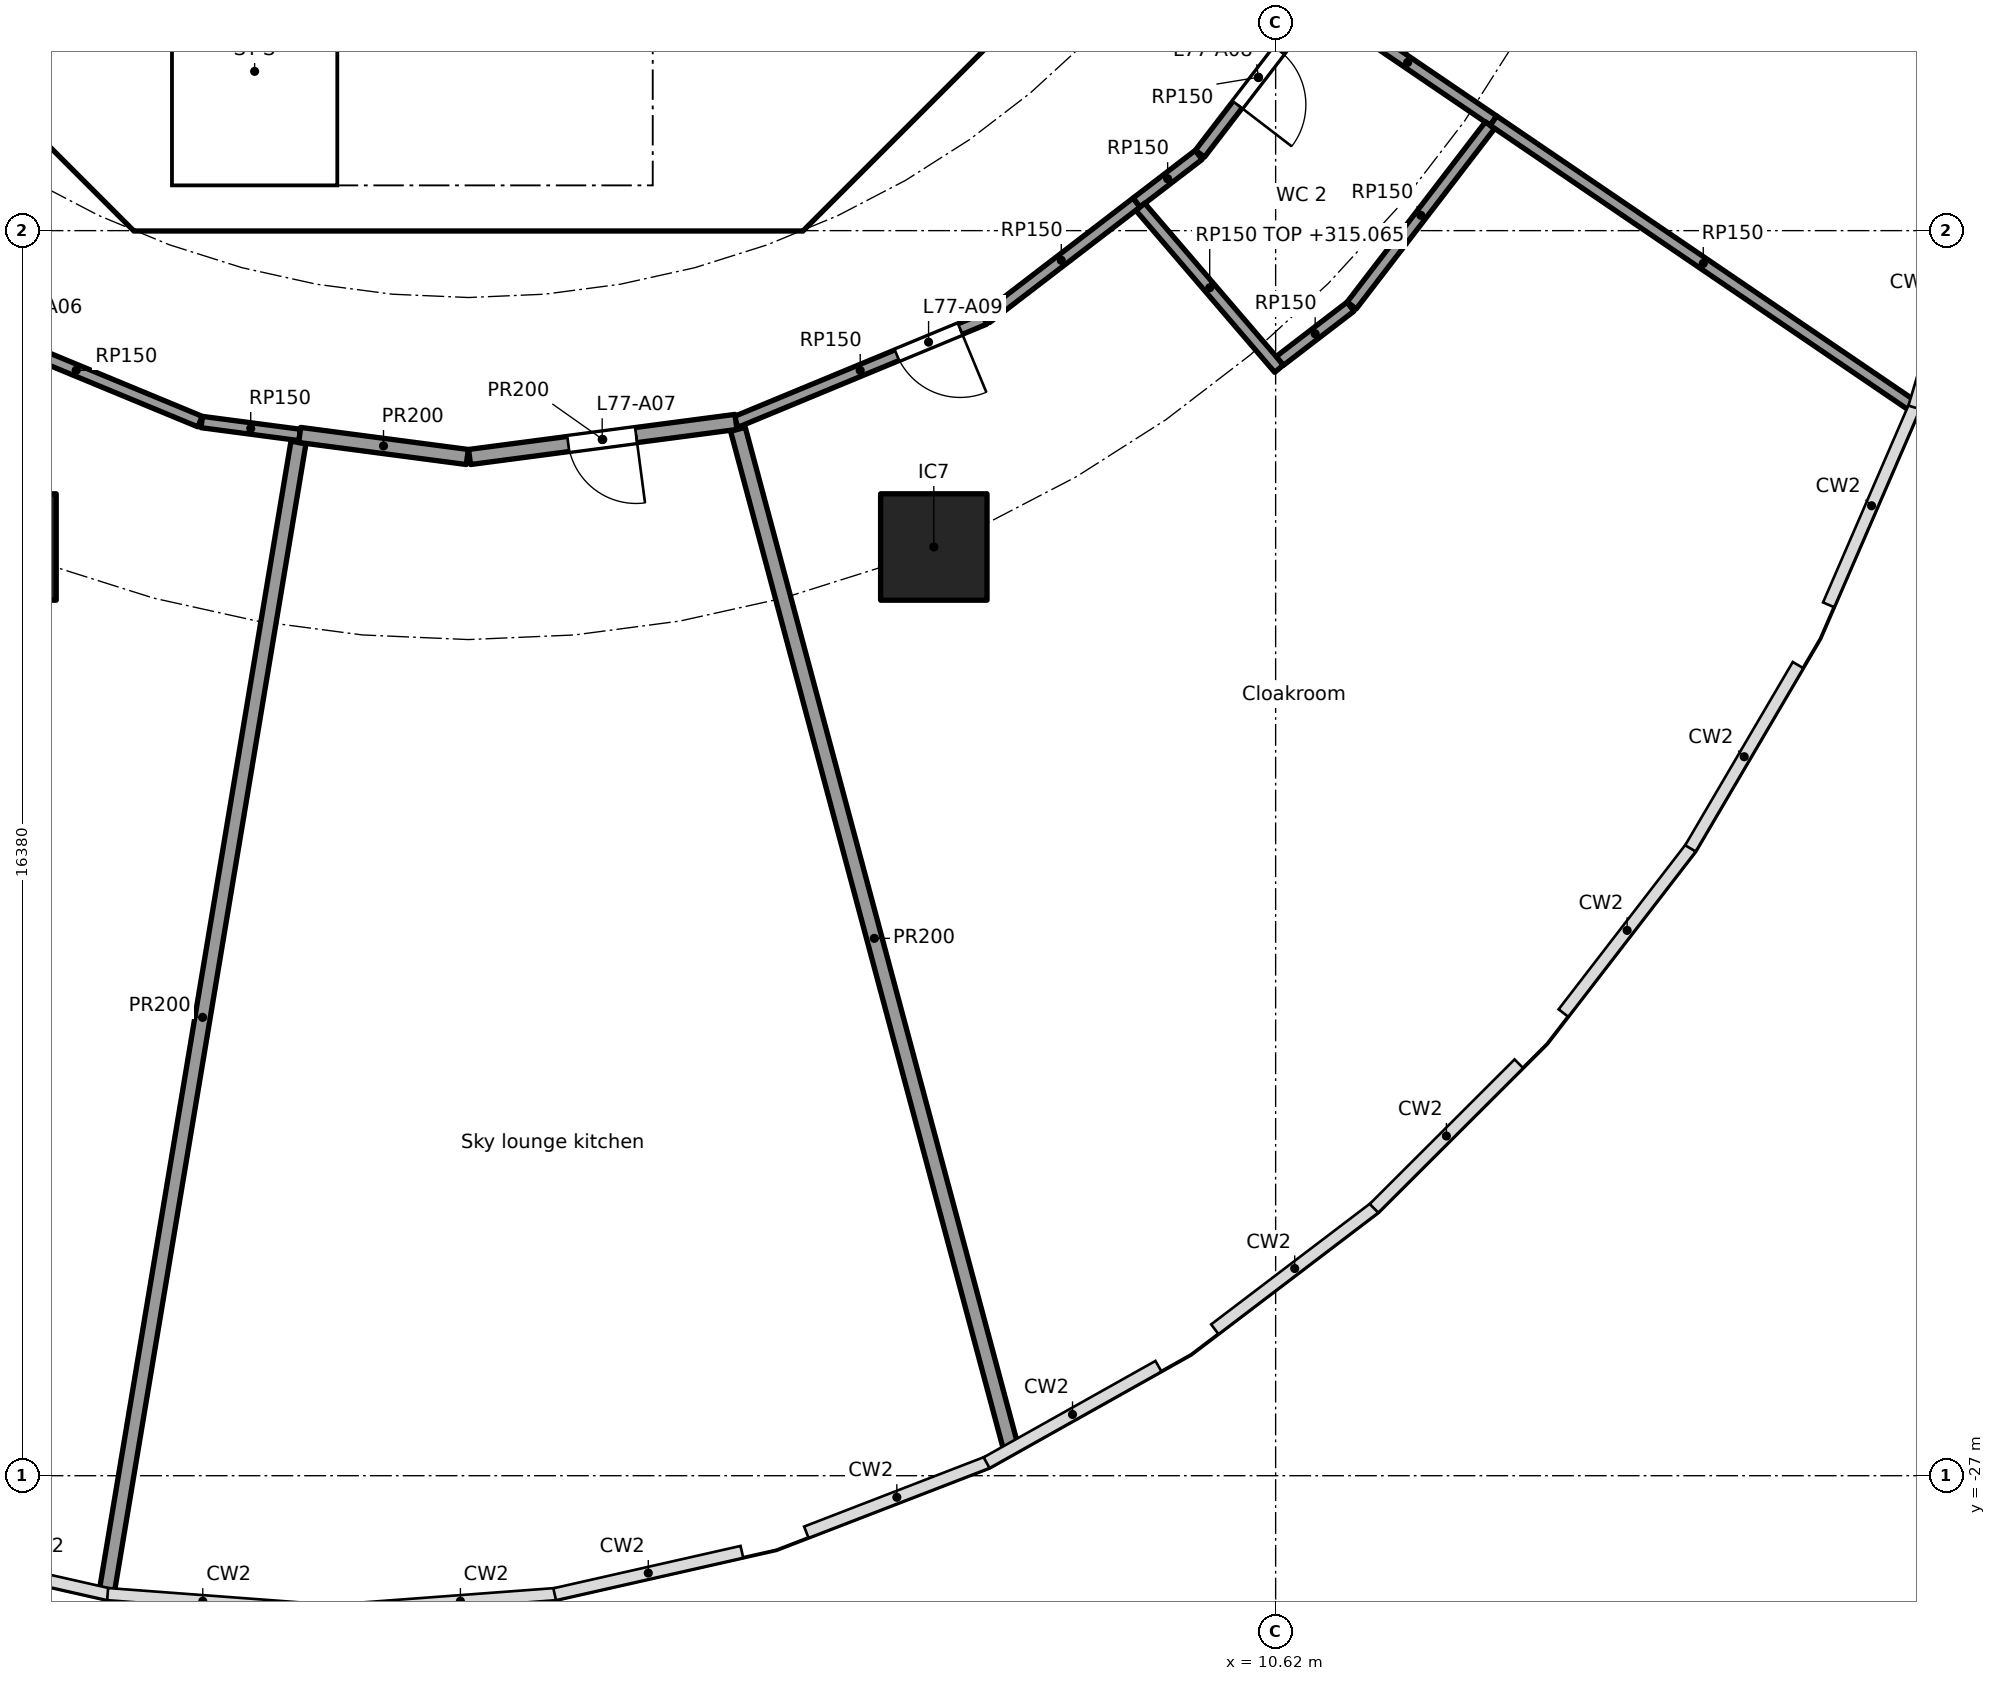
"""IFC4 building model, lengths in metres.
Left out: names, types, materials, properties, quantities, classifications, styles, units other than length and angle.
Written with IfcOpenShell. Run it as: python <this file> out.ifc"""

import sys

from ifc_helpers import new_model, si_unit, direction, frame, frame_2d, origin, origin_2d, place, context, subcontext, project, spatial, polyline, rectangle, outline, extrude, element, fill, save


model = new_model("IFC4")
c1 = context("Model", 3, precision=1e-05, world=origin(), true_north=direction((0.0, 1.0)))
c2 = subcontext(c1, "Body", "Model", "MODEL_VIEW")
j1 = project(units=[si_unit("LENGTHUNIT", "METRE"), si_unit("PLANEANGLEUNIT", "RADIAN")], contexts=[c1])
p1 = place(None, origin())
s1 = spatial("IfcSite", under=j1, at=p1, CompositionType="ELEMENT")
p2 = place(p1, origin())
s2 = spatial("IfcBuilding", under=s1, at=p2, CompositionType="ELEMENT")
p3 = place(p2, frame((0.0, 0.0, 310.3)))
s3 = spatial("IfcBuildingStorey", under=s2, at=p3, CompositionType="ELEMENT", Elevation=310.3)
for number, where, z_axis, x_axis in (
    (1, (-6.123, -14.782, 0.0), (0.0, 0.0, 1.0), (1.0, 0.0, 0.0)),
    (2, (6.123, -14.782, 0.0), (0.0, 0.0, 1.0), (1.0, 0.0, 0.0)),
):
    element("IfcColumn", number, at=place(p3, frame(where, z_axis=z_axis, x_axis=x_axis)), inside=s3, PredefinedType="COLUMN", context=c2, shape_type="SweptSolid", body=[
        extrude(rectangle(XDim=1.4, YDim=1.4, at=origin_2d()), origin(), (0.0, 0.0, 1.0), 5.6),
    ])
p4 = place(p3, frame((-9.988, -4.613, 0.0), z_axis=(0.0, 0.0, 1.0), x_axis=(0.707106781187, -0.707106781187, 0.0)))
e3 = element("IfcWall", 3, at=p4, inside=s3, PredefinedType="SHEAR", context=c2, shape_type="SweptSolid", body=[
    extrude(rectangle(XDim=7.602, YDim=0.6, at=frame_2d((3.801, 0.0))), origin(), (0.0, 0.0, 1.0), 5.3),
])
p5 = place(p4, frame((6.151, 0.0, 0.0)))
e4 = element("IfcOpeningElement", 4, at=p5, cuts=e3, PredefinedType="OPENING", context=c2, shape_type="SweptSolid", body=[
    extrude(rectangle(XDim=1.1, YDim=2.1, at=frame_2d((0.55, 1.05))), frame((0.0, 0.31, 0.0), z_axis=(0.0, -1.0, 0.0), x_axis=(1.0, 0.0, 0.0)), (0.0, 0.0, 1.0), 0.62),
])
p6 = place(p3, frame((4.613, -9.988, 0.0), z_axis=(0.0, 0.0, 1.0), x_axis=(0.707106781187, 0.707106781187, 0.0)))
e5 = element("IfcWall", 5, at=p6, inside=s3, PredefinedType="SHEAR", context=c2, shape_type="SweptSolid", body=[
    extrude(rectangle(XDim=7.602, YDim=0.6, at=frame_2d((3.801, 0.0))), origin(), (0.0, 0.0, 1.0), 5.3),
])
p7 = place(p6, frame((3.201, 0.0, 0.0)))
e6 = element("IfcOpeningElement", 6, at=p7, cuts=e5, PredefinedType="OPENING", context=c2, shape_type="SweptSolid", body=[
    extrude(rectangle(XDim=1.2, YDim=2.1, at=frame_2d((0.6, 1.05))), frame((0.0, 0.31, 0.0), z_axis=(0.0, -1.0, 0.0), x_axis=(1.0, 0.0, 0.0)), (0.0, 0.0, 1.0), 0.62),
])
p8 = place(p3, frame((4.0, -10.025, 0.0), z_axis=(0.0, 0.0, 1.0), x_axis=(0.0, 1.0, 0.0)))
e7 = element("IfcWall", 7, at=p8, inside=s3, PredefinedType="SOLIDWALL", context=c2, shape_type="SweptSolid", body=[
    extrude(rectangle(XDim=3.0, YDim=0.2, at=frame_2d((1.5, 0.0))), origin(), (0.0, 0.0, 1.0), 5.3),
])
p9 = place(p8, frame((0.975, 0.0, 0.0)))
e8 = element("IfcOpeningElement", 8, at=p9, cuts=e7, PredefinedType="OPENING", context=c2, shape_type="SweptSolid", body=[
    extrude(rectangle(XDim=1.1, YDim=2.1, at=frame_2d((0.55, 1.05))), frame((0.0, 0.11, 0.0), z_axis=(0.0, -1.0, 0.0), x_axis=(1.0, 0.0, 0.0)), (0.0, 0.0, 1.0), 0.22),
])
p10 = place(p3, origin())
e9 = element("IfcWall", 9, at=p10, inside=s3, PredefinedType="SHEAR", context=c2, shape_type="SweptSolid", body=[
    extrude(outline(polyline([(-4.152, -10.025), (4.152, -10.025), (4.401, -9.776), (4.825, -10.2), (4.401, -10.625), (-4.401, -10.625), (-4.825, -10.2), (-4.401, -9.776), (-4.152, -10.025)])), origin(), (0.0, 0.0, 1.0), 5.3),
])
p11 = place(p3, origin())
e10 = element("IfcWall", 10, at=p11, inside=s3, PredefinedType="SOLIDWALL", context=c2, shape_type="SweptSolid", body=[
    extrude(outline(polyline([(-3.9, -10.025), (-4.1, -10.025), (-4.1, -7.025), (-3.9, -7.025), (-3.9, -10.025)])), origin(), (0.0, 0.0, 1.0), 5.3),
])
p12 = place(p3, frame((-3.531, -13.132, 0.0), z_axis=(0.0, 0.0, 1.0), x_axis=(-0.923881838111, 0.382677866108, 0.0)))
e11 = element("IfcWall", 11, at=p12, inside=s3, PredefinedType="PARTITIONING", context=c2, shape_type="SweptSolid", body=[
    extrude(rectangle(XDim=3.527, YDim=0.15, at=frame_2d((1.763, 0.0))), origin(), (0.0, 0.0, 1.0), 5.3),
])
p13 = place(p12, frame((2.281, 0.0, 0.0)))
e12 = element("IfcOpeningElement", 12, at=p13, cuts=e11, PredefinedType="OPENING", context=c2, shape_type="SweptSolid", body=[
    extrude(rectangle(XDim=0.9, YDim=2.1, at=frame_2d((0.45, 1.05))), frame((0.0, 0.085, 0.0), z_axis=(0.0, -1.0, 0.0), x_axis=(1.0, 0.0, 0.0)), (0.0, 0.0, 1.0), 0.17),
])
p14 = place(p3, frame((-2.219, -13.308, 0.0), z_axis=(0.0, 0.0, 1.0), x_axis=(-0.991441503566, 0.130551694767, 0.0)))
e13 = element("IfcWall", 13, at=p14, inside=s3, PredefinedType="PARTITIONING", context=c2, shape_type="SweptSolid", body=[
    extrude(rectangle(XDim=1.3, YDim=0.15, at=frame_2d((0.65, 0.0))), origin(), (0.0, 0.0, 1.0), 5.3),
])
p15 = place(p3, frame((6.789, -11.782, 0.0), z_axis=(0.0, 0.0, 1.0), x_axis=(-0.923862934009, -0.382723502237, 0.0)))
e14 = element("IfcWall", 14, at=p15, inside=s3, PredefinedType="PARTITIONING", context=c2, shape_type="SweptSolid", body=[
    extrude(rectangle(XDim=3.538, YDim=0.15, at=frame_2d((1.769, 0.0))), origin(), (0.0, 0.0, 1.0), 5.3),
])
p16 = place(p15, frame((0.346, 0.0, 0.0)))
e15 = element("IfcOpeningElement", 15, at=p16, cuts=e14, PredefinedType="OPENING", context=c2, shape_type="SweptSolid", body=[
    extrude(rectangle(XDim=0.9, YDim=2.1, at=frame_2d((0.45, 1.05))), frame((0.0, 0.085, 0.0), z_axis=(0.0, -1.0, 0.0), x_axis=(1.0, 0.0, 0.0)), (0.0, 0.0, 1.0), 0.17),
])
p17 = place(p3, frame((8.791, -10.25, 0.0), z_axis=(0.0, 0.0, 1.0), x_axis=(-0.7933828864, -0.608722921835, 0.0)))
e16 = element("IfcWall", 16, at=p17, inside=s3, PredefinedType="PARTITIONING", context=c2, shape_type="SweptSolid", body=[
    extrude(rectangle(XDim=2.498, YDim=0.15, at=frame_2d((1.249, 0.0))), origin(), (0.0, 0.0, 1.0), 5.3),
])
p18 = place(p3, frame((9.607, -9.624, 0.0), z_axis=(0.0, 0.0, 1.0), x_axis=(-0.793346631306, -0.608770172228, 0.0)))
e17 = element("IfcWall", 17, at=p18, inside=s3, PredefinedType="PARTITIONING", context=c2, shape_type="SweptSolid", body=[
    extrude(rectangle(XDim=1.029, YDim=0.15, at=frame_2d((0.515, 0.0))), origin(), (0.0, 0.0, 1.0), 5.3),
])
p19 = place(p3, frame((10.665, -12.436, 0.0), z_axis=(0.0, 0.0, 1.0), x_axis=(-0.651063790324, 0.759023017391, 0.0)))
e18 = element("IfcWall", 18, at=p19, inside=s3, PredefinedType="PARTITIONING", context=c2, shape_type="SweptSolid", body=[
    extrude(rectangle(XDim=2.804, YDim=0.15, at=frame_2d((1.402, 0.0))), origin(), (0.0, 0.0, 1.0), 4.765),
])
p20 = place(p3, frame((11.167, -7.596, 0.0), z_axis=(0.0, 0.0, 1.0), x_axis=(-0.60871867817, -0.793386142334, 0.0)))
e19 = element("IfcWall", 19, at=p20, inside=s3, PredefinedType="PARTITIONING", context=c2, shape_type="SweptSolid", body=[
    extrude(rectangle(XDim=2.534, YDim=0.15, at=frame_2d((1.267, 0.0))), origin(), (0.0, 0.0, 1.0), 5.3),
])
p21 = place(p20, frame((0.823, 0.0, 0.0)))
e20 = element("IfcOpeningElement", 20, at=p21, cuts=e19, PredefinedType="OPENING", context=c2, shape_type="SweptSolid", body=[
    extrude(rectangle(XDim=0.9, YDim=2.1, at=frame_2d((0.45, 1.05))), frame((0.0, 0.085, 0.0), z_axis=(0.0, -1.0, 0.0), x_axis=(1.0, 0.0, 0.0)), (0.0, 0.0, 1.0), 0.17),
])
p22 = place(p3, frame((11.229, -7.639, 0.0), z_axis=(0.0, 0.0, 1.0), x_axis=(0.826811683889, -0.56247883461, 0.0)))
e21 = element("IfcWall", 21, at=p22, inside=s3, PredefinedType="PARTITIONING", context=c2, shape_type="SweptSolid", body=[
    extrude(rectangle(XDim=2.729, YDim=0.15, at=frame_2d((1.365, 0.0))), origin(), (0.0, 0.0, 1.0), 5.3),
])
p23 = place(p3, frame((11.604, -11.621, 0.0), z_axis=(0.0, 0.0, 1.0), x_axis=(-0.793367902565, -0.608742450614, 0.0)))
e22 = element("IfcWall", 22, at=p23, inside=s3, PredefinedType="PARTITIONING", context=c2, shape_type="SweptSolid", body=[
    extrude(rectangle(XDim=1.17, YDim=0.15, at=frame_2d((0.585, 0.0))), origin(), (0.0, 0.0, 1.0), 5.3),
])
p24 = place(p3, frame((13.44, -9.233, 0.0), z_axis=(0.0, 0.0, 1.0), x_axis=(-0.60873508117, -0.793373557004, 0.0)))
e23 = element("IfcWall", 23, at=p24, inside=s3, PredefinedType="PARTITIONING", context=c2, shape_type="SweptSolid", body=[
    extrude(rectangle(XDim=2.988, YDim=0.15, at=frame_2d((1.494, 0.0))), origin(), (0.0, 0.0, 1.0), 5.3),
])
p25 = place(p3, frame((13.486, -9.174, 0.0), z_axis=(0.0, 0.0, 1.0), x_axis=(0.826826499796, -0.562457055459, 0.0)))
e24 = element("IfcWall", 24, at=p25, inside=s3, PredefinedType="PARTITIONING", context=c2, shape_type="SweptSolid", body=[
    extrude(rectangle(XDim=6.676, YDim=0.15, at=frame_2d((3.338, 0.0))), origin(), (0.0, 0.0, 1.0), 5.3),
])
p26 = place(p3, frame((-2.236, -13.406, 0.0), z_axis=(0.0, 0.0, 1.0), x_axis=(-0.164512574318, -0.986374985942, 0.0)))
e25 = element("IfcWall", 25, at=p26, inside=s3, PredefinedType="PARTITIONING", context=c2, shape_type="SweptSolid", body=[
    extrude(rectangle(XDim=15.336, YDim=0.2, at=frame_2d((7.668, 0.0))), origin(), (0.0, 0.0, 1.0), 5.3),
])
p27 = place(p3, frame((-0.015, -13.598, 0.0), z_axis=(0.0, 0.0, 1.0), x_axis=(-0.991454669289, 0.130451672069, 0.0)))
e26 = element("IfcWall", 26, at=p27, inside=s3, PredefinedType="PARTITIONING", context=c2, shape_type="SweptSolid", body=[
    extrude(rectangle(XDim=2.223, YDim=0.2, at=frame_2d((1.112, 0.0))), origin(), (0.0, 0.0, 1.0), 5.3),
])
p28 = place(p3, frame((3.52, -13.137, 0.0), z_axis=(0.0, 0.0, 1.0), x_axis=(-0.991453825407, -0.130458085553, 0.0)))
e27 = element("IfcWall", 27, at=p28, inside=s3, PredefinedType="PARTITIONING", context=c2, shape_type="SweptSolid", body=[
    extrude(rectangle(XDim=3.535, YDim=0.2, at=frame_2d((1.768, 0.0))), origin(), (0.0, 0.0, 1.0), 5.3),
])
p29 = place(p28, frame((1.325, 0.0, 0.0)))
e28 = element("IfcOpeningElement", 28, at=p29, cuts=e27, PredefinedType="OPENING", context=c2, shape_type="SweptSolid", body=[
    extrude(rectangle(XDim=0.9, YDim=2.1, at=frame_2d((0.45, 1.05))), frame((0.0, 0.11, 0.0), z_axis=(0.0, -1.0, 0.0), x_axis=(1.0, 0.0, 0.0)), (0.0, 0.0, 1.0), 0.22),
])
p30 = place(p3, frame((7.135, -26.627, 0.0), z_axis=(0.0, 0.0, 1.0), x_axis=(-0.258828495285, 0.965923294071, 0.0)))
e29 = element("IfcWall", 29, at=p30, inside=s3, PredefinedType="PARTITIONING", context=c2, shape_type="SweptSolid", body=[
    extrude(rectangle(XDim=13.866, YDim=0.2, at=frame_2d((6.933, 0.0))), origin(), (0.0, 0.0, 1.0), 5.3),
])
p31 = place(p9, origin())
e30 = element("IfcDoor", 30, at=p31, inside=s3, OperationType="SINGLE_SWING_RIGHT", PredefinedType="DOOR", context=c2, shape_type="SweptSolid", body=[
    extrude(rectangle(XDim=1.1, YDim=2.1, at=frame_2d((0.55, 1.05))), frame((0.0, 0.025, 0.0), z_axis=(0.0, -1.0, 0.0), x_axis=(1.0, 0.0, 0.0)), (0.0, 0.0, 1.0), 0.05),
])
fill(e8, e30)
p32 = place(p5, origin())
e31 = element("IfcDoor", 31, at=p32, inside=s3, OperationType="SINGLE_SWING_LEFT", PredefinedType="DOOR", context=c2, shape_type="SweptSolid", body=[
    extrude(rectangle(XDim=1.1, YDim=2.1, at=frame_2d((0.55, 1.05))), frame((0.0, 0.025, 0.0), z_axis=(0.0, -1.0, 0.0), x_axis=(1.0, 0.0, 0.0)), (0.0, 0.0, 1.0), 0.05),
])
fill(e4, e31)
p33 = place(p29, origin())
e32 = element("IfcDoor", 32, at=p33, inside=s3, OperationType="SINGLE_SWING_LEFT", PredefinedType="DOOR", context=c2, shape_type="SweptSolid", body=[
    extrude(rectangle(XDim=0.9, YDim=2.1, at=frame_2d((0.45, 1.05))), frame((0.0, 0.025, 0.0), z_axis=(0.0, -1.0, 0.0), x_axis=(1.0, 0.0, 0.0)), (0.0, 0.0, 1.0), 0.05),
])
fill(e28, e32)
p34 = place(p21, origin())
e33 = element("IfcDoor", 33, at=p34, inside=s3, OperationType="SINGLE_SWING_RIGHT", PredefinedType="DOOR", context=c2, shape_type="SweptSolid", body=[
    extrude(rectangle(XDim=0.9, YDim=2.1, at=frame_2d((0.45, 1.05))), frame((0.0, 0.025, 0.0), z_axis=(0.0, -1.0, 0.0), x_axis=(1.0, 0.0, 0.0)), (0.0, 0.0, 1.0), 0.05),
])
fill(e20, e33)
p35 = place(p16, origin())
e34 = element("IfcDoor", 34, at=p35, inside=s3, OperationType="SINGLE_SWING_LEFT", PredefinedType="DOOR", context=c2, shape_type="SweptSolid", body=[
    extrude(rectangle(XDim=0.9, YDim=2.1, at=frame_2d((0.45, 1.05))), frame((0.0, 0.025, 0.0), z_axis=(0.0, -1.0, 0.0), x_axis=(1.0, 0.0, 0.0)), (0.0, 0.0, 1.0), 0.05),
])
fill(e15, e34)
save(model, sys.argv[1])
